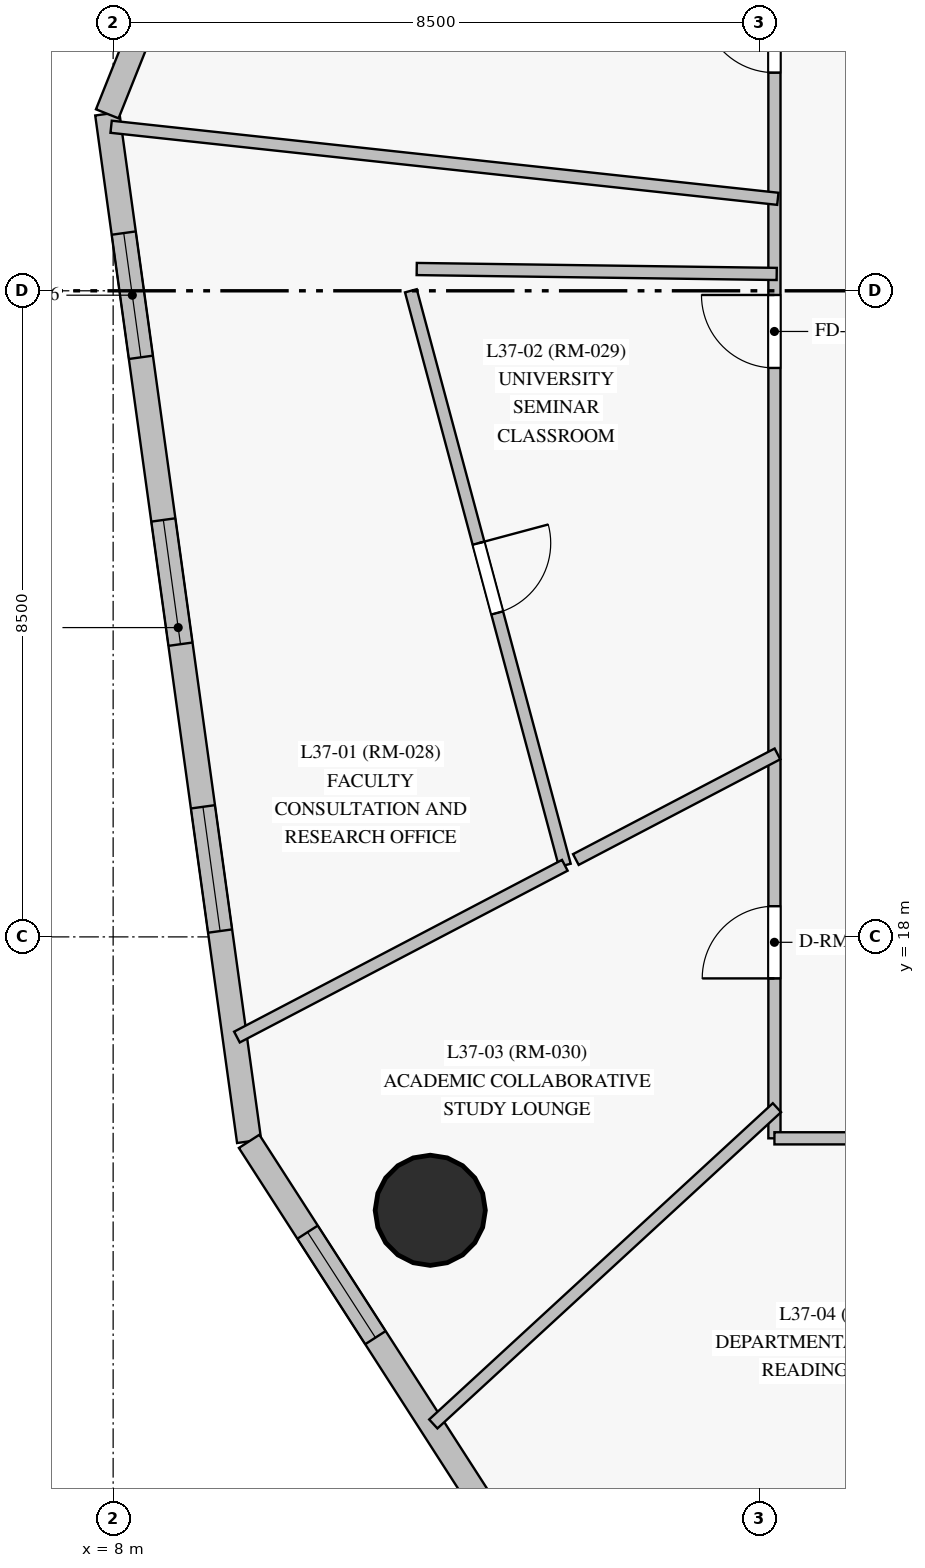
"""IFC4 building model, lengths in metres.
Left out: names, types, materials, properties, quantities, classifications, styles, units other than length and angle.
Written with IfcOpenShell. Run it as: python <this file> out.ifc"""

import sys

from ifc_helpers import new_model, si_unit, direction, frame, frame_2d, origin, origin_with_axes, origin_2d, place, context, subcontext, project, spatial, rectangle, circle, extrude, source, transform, mapped, element, fill, save


model = new_model("IFC4")
c1 = context("Model", 3, precision=1e-05, world=origin(), true_north=direction((0.0, 1.0)))
c2 = subcontext(c1, "Body", "Model", "MODEL_VIEW")
j1 = project(units=[si_unit("LENGTHUNIT", "METRE"), si_unit("PLANEANGLEUNIT", "RADIAN")], contexts=[c1])
p1 = place(None, origin())
s1 = spatial("IfcSite", under=j1, at=p1, CompositionType="ELEMENT")
p2 = place(p1, origin())
s2 = spatial("IfcBuilding", under=s1, at=p2, CompositionType="ELEMENT")
p3 = place(p2, frame((0.0, 0.0, 132.8)))
s3 = spatial("IfcBuildingStorey", under=s2, at=p3, CompositionType="ELEMENT", Elevation=132.8)
m1 = source(origin_with_axes(), c2, "Body", "SweptSolid", [
    extrude(circle(Radius=0.725, at=origin_2d()), origin(), (0.0, 0.0, 1.0), 3.05),
])
p4 = place(p3, frame((12.172, 14.403, 0.0), z_axis=(0.0, 0.0, 1.0), x_axis=(1.0, 0.0, 0.0)))
e1 = element("IfcColumn", 1, at=p4, inside=s3, PredefinedType="COLUMN", context=c2, shape_type="MappedRepresentation", body=[
    mapped(m1, transform((0.0, 0.0, 0.0), scale=1.0)),
])
p5 = place(p3, frame((7.923, 28.828, 0.0), z_axis=(0.0, 0.0, 1.0), x_axis=(0.136771186791, -0.990602666291, 0.0)))
e2 = element("IfcWall", 2, at=p5, inside=s3, PredefinedType="SOLIDWALL", context=c2, shape_type="SweptSolid", body=[
    extrude(rectangle(XDim=13.646, YDim=0.32, at=frame_2d((6.823, 0.0))), origin(), (0.0, 0.0, 1.0), 2.825),
])
p6 = place(p5, frame((1.584, 0.0, 0.85)))
e3 = element("IfcOpeningElement", 3, at=p6, cuts=e2, PredefinedType="OPENING", context=c2, shape_type="SweptSolid", body=[
    extrude(rectangle(XDim=1.65, YDim=1.65, at=frame_2d((0.825, 0.825))), frame((0.0, 0.17, 0.0), z_axis=(0.0, -1.0, 0.0), x_axis=(1.0, 0.0, 0.0)), (0.0, 0.0, 1.0), 0.34),
])
p7 = place(p5, frame((5.394, 0.0, 0.85)))
e4 = element("IfcOpeningElement", 4, at=p7, cuts=e2, PredefinedType="OPENING", context=c2, shape_type="SweptSolid", body=[
    extrude(rectangle(XDim=1.65, YDim=1.65, at=frame_2d((0.825, 0.825))), frame((0.0, 0.17, 0.0), z_axis=(0.0, -1.0, 0.0), x_axis=(1.0, 0.0, 0.0)), (0.0, 0.0, 1.0), 0.34),
])
p8 = place(p5, frame((9.204, 0.0, 0.85)))
e5 = element("IfcOpeningElement", 5, at=p8, cuts=e2, PredefinedType="OPENING", context=c2, shape_type="SweptSolid", body=[
    extrude(rectangle(XDim=1.65, YDim=1.65, at=frame_2d((0.825, 0.825))), frame((0.0, 0.17, 0.0), z_axis=(0.0, -1.0, 0.0), x_axis=(1.0, 0.0, 0.0)), (0.0, 0.0, 1.0), 0.34),
])
p9 = place(p3, frame((9.789, 15.31, 0.0), z_axis=(0.0, 0.0, 1.0), x_axis=(0.541166732634, -0.840915315291, 0.0)))
e6 = element("IfcWall", 6, at=p9, inside=s3, PredefinedType="SOLIDWALL", context=c2, shape_type="SweptSolid", body=[
    extrude(rectangle(XDim=9.438, YDim=0.32, at=frame_2d((4.719, 0.0))), origin(), (0.0, 0.0, 1.0), 2.825),
])
p10 = place(p9, frame((1.421, 0.0, 0.85)))
e7 = element("IfcOpeningElement", 7, at=p10, cuts=e6, PredefinedType="OPENING", context=c2, shape_type="SweptSolid", body=[
    extrude(rectangle(XDim=1.65, YDim=1.65, at=frame_2d((0.825, 0.825))), frame((0.0, 0.17, 0.0), z_axis=(0.0, -1.0, 0.0), x_axis=(1.0, 0.0, 0.0)), (0.0, 0.0, 1.0), 0.34),
])
p11 = place(p9, frame((6.08, 0.0, 0.85)))
e8 = element("IfcOpeningElement", 8, at=p11, cuts=e6, PredefinedType="OPENING", context=c2, shape_type="SweptSolid", body=[
    extrude(rectangle(XDim=1.65, YDim=1.65, at=frame_2d((0.825, 0.825))), frame((0.0, 0.17, 0.0), z_axis=(0.0, -1.0, 0.0), x_axis=(1.0, 0.0, 0.0)), (0.0, 0.0, 1.0), 0.34),
])
p12 = place(p3, frame((11.975, 38.981, 0.0), z_axis=(0.0, 0.0, 1.0), x_axis=(-0.370728292026, -0.928741370615, 0.0)))
e9 = element("IfcWall", 9, at=p12, inside=s3, PredefinedType="SOLIDWALL", context=c2, shape_type="SweptSolid", body=[
    extrude(rectangle(XDim=10.932, YDim=0.32, at=frame_2d((5.466, 0.0))), origin(), (0.0, 0.0, 1.0), 2.825),
])
p13 = place(p12, frame((2.215, 0.0, 0.85)))
e10 = element("IfcOpeningElement", 10, at=p13, cuts=e9, PredefinedType="OPENING", context=c2, shape_type="SweptSolid", body=[
    extrude(rectangle(XDim=1.65, YDim=1.65, at=frame_2d((0.825, 0.825))), frame((0.0, 0.17, 0.0), z_axis=(0.0, -1.0, 0.0), x_axis=(1.0, 0.0, 0.0)), (0.0, 0.0, 1.0), 0.34),
])
p14 = place(p12, frame((7.62, 0.0, 0.85)))
e11 = element("IfcOpeningElement", 11, at=p14, cuts=e9, PredefinedType="OPENING", context=c2, shape_type="SweptSolid", body=[
    extrude(rectangle(XDim=1.65, YDim=1.65, at=frame_2d((0.825, 0.825))), frame((0.0, 0.17, 0.0), z_axis=(0.0, -1.0, 0.0), x_axis=(1.0, 0.0, 0.0)), (0.0, 0.0, 1.0), 0.34),
])
p15 = place(p3, frame((16.7, 15.35, 0.0), z_axis=(0.0, 0.0, 1.0), x_axis=(0.0, 1.0, 0.0)))
e12 = element("IfcWall", 12, at=p15, inside=s3, PredefinedType="PARTITIONING", context=c2, shape_type="SweptSolid", body=[
    extrude(rectangle(XDim=22.3, YDim=0.16, at=frame_2d((11.15, 0.0))), origin(), (0.0, 0.0, 1.0), 2.225),
])
p16 = place(p15, frame((10.135, 0.0, 0.0)))
e13 = element("IfcOpeningElement", 13, at=p16, cuts=e12, PredefinedType="OPENING", context=c2, shape_type="SweptSolid", body=[
    extrude(rectangle(XDim=0.96, YDim=2.15, at=frame_2d((0.48, 1.075))), frame((0.0, 0.09, 0.0), z_axis=(0.0, -1.0, 0.0), x_axis=(1.0, 0.0, 0.0)), (0.0, 0.0, 1.0), 0.18),
])
p17 = place(p15, frame((2.104, 0.0, 0.0)))
e14 = element("IfcOpeningElement", 14, at=p17, cuts=e12, PredefinedType="OPENING", context=c2, shape_type="SweptSolid", body=[
    extrude(rectangle(XDim=0.95, YDim=2.15, at=frame_2d((0.475, 1.075))), frame((0.0, 0.09, 0.0), z_axis=(0.0, -1.0, 0.0), x_axis=(1.0, 0.0, 0.0)), (0.0, 0.0, 1.0), 0.18),
])
p18 = place(p15, frame((14.02, 0.0, 0.0)))
e15 = element("IfcOpeningElement", 15, at=p18, cuts=e12, PredefinedType="OPENING", context=c2, shape_type="SweptSolid", body=[
    extrude(rectangle(XDim=0.95, YDim=2.15, at=frame_2d((0.475, 1.075))), frame((0.0, 0.09, 0.0), z_axis=(0.0, -1.0, 0.0), x_axis=(1.0, 0.0, 0.0)), (0.0, 0.0, 1.0), 0.18),
])
p19 = place(p3, frame((27.55, 15.35, 0.0), z_axis=(0.0, 0.0, 1.0), x_axis=(-1.0, 0.0, 0.0)))
e16 = element("IfcWall", 16, at=p19, inside=s3, PredefinedType="PARTITIONING", context=c2, shape_type="SweptSolid", body=[
    extrude(rectangle(XDim=10.85, YDim=0.16, at=frame_2d((5.425, 0.0))), origin(), (0.0, 0.0, 1.0), 2.325),
])
p20 = place(p19, frame((6.577, 0.0, 0.0)))
e17 = element("IfcOpeningElement", 17, at=p20, cuts=e16, PredefinedType="OPENING", context=c2, shape_type="SweptSolid", body=[
    extrude(rectangle(XDim=0.95, YDim=2.15, at=frame_2d((0.475, 1.075))), frame((0.0, 0.09, 0.0), z_axis=(0.0, -1.0, 0.0), x_axis=(1.0, 0.0, 0.0)), (0.0, 0.0, 1.0), 0.18),
])
p21 = place(p19, frame((3.512, 0.0, 0.0)))
e18 = element("IfcOpeningElement", 18, at=p21, cuts=e16, PredefinedType="OPENING", context=c2, shape_type="SweptSolid", body=[
    extrude(rectangle(XDim=0.95, YDim=2.15, at=frame_2d((0.475, 1.075))), frame((0.0, 0.09, 0.0), z_axis=(0.0, -1.0, 0.0), x_axis=(1.0, 0.0, 0.0)), (0.0, 0.0, 1.0), 0.18),
])
p22 = place(p19, frame((1.948, 0.0, 0.0)))
e19 = element("IfcOpeningElement", 19, at=p22, cuts=e16, PredefinedType="OPENING", context=c2, shape_type="SweptSolid", body=[
    extrude(rectangle(XDim=0.95, YDim=2.15, at=frame_2d((0.475, 1.075))), frame((0.0, 0.09, 0.0), z_axis=(0.0, -1.0, 0.0), x_axis=(1.0, 0.0, 0.0)), (0.0, 0.0, 1.0), 0.18),
])
p23 = place(p3, frame((22.265, 15.376, 0.0), z_axis=(0.0, 0.0, 1.0), x_axis=(-0.484869000513, -0.874586789485, 0.0)))
e20 = element("IfcWall", 20, at=p23, inside=s3, PredefinedType="PARTITIONING", context=c2, shape_type="SweptSolid", body=[
    extrude(rectangle(XDim=10.502, YDim=0.16, at=frame_2d((5.251, 0.0))), origin(), (0.0, 0.0, 1.0), 2.825),
])
p24 = place(p3, frame((7.973, 28.658, 0.0), z_axis=(0.0, 0.0, 1.0), x_axis=(0.994210323824, -0.107451533272, 0.0)))
e21 = element("IfcWall", 21, at=p24, inside=s3, PredefinedType="PARTITIONING", context=c2, shape_type="SweptSolid", body=[
    extrude(rectangle(XDim=8.823, YDim=0.16, at=frame_2d((4.411, 0.0))), origin(), (0.0, 0.0, 1.0), 2.825),
])
p25 = place(p3, frame((11.917, 26.5, 0.0), z_axis=(0.0, 0.0, 1.0), x_axis=(0.258814064206, -0.965927160903, 0.0)))
e22 = element("IfcWall", 22, at=p25, inside=s3, PredefinedType="PARTITIONING", context=c2, shape_type="SweptSolid", body=[
    extrude(rectangle(XDim=7.825, YDim=0.16, at=frame_2d((3.912, 0.0))), origin(), (0.0, 0.0, 1.0), 2.225),
])
p26 = place(p25, frame((3.438, 0.0, 0.0)))
e23 = element("IfcOpeningElement", 23, at=p26, cuts=e22, PredefinedType="OPENING", context=c2, shape_type="SweptSolid", body=[
    extrude(rectangle(XDim=0.95, YDim=2.15, at=frame_2d((0.475, 1.075))), frame((0.0, 0.09, 0.0), z_axis=(0.0, -1.0, 0.0), x_axis=(1.0, 0.0, 0.0)), (0.0, 0.0, 1.0), 0.18),
])
p27 = place(p3, frame((16.733, 15.753, 0.0), z_axis=(0.0, 0.0, 1.0), x_axis=(-0.73584309599, -0.677152078992, 0.0)))
e24 = element("IfcWall", 24, at=p27, inside=s3, PredefinedType="PARTITIONING", context=c2, shape_type="SweptSolid", body=[
    extrude(rectangle(XDim=6.144, YDim=0.16, at=frame_2d((3.072, 0.0))), origin(), (0.0, 0.0, 1.0), 2.825),
])
p28 = place(p3, frame((13.942, 18.942, 0.0), z_axis=(0.0, 0.0, 1.0), x_axis=(-0.885814853162, -0.464038840957, 0.0)))
e25 = element("IfcWall", 25, at=p28, inside=s3, PredefinedType="PARTITIONING", context=c2, shape_type="SweptSolid", body=[
    extrude(rectangle(XDim=4.87, YDim=0.16, at=frame_2d((2.435, 0.0))), origin(), (0.0, 0.0, 1.0), 2.825),
])
p29 = place(p3, frame((16.73, 26.722, 0.0), z_axis=(0.0, 0.0, 1.0), x_axis=(-0.999906003138, 0.013710758123, 0.0)))
e26 = element("IfcWall", 26, at=p29, inside=s3, PredefinedType="PARTITIONING", context=c2, shape_type="SweptSolid", body=[
    extrude(rectangle(XDim=4.737, YDim=0.16, at=frame_2d((2.368, 0.0))), origin(), (0.0, 0.0, 1.0), 2.825),
])
p30 = place(p3, frame((16.74, 20.407, 0.0), z_axis=(0.0, 0.0, 1.0), x_axis=(-0.885820363554, -0.464028321887, 0.0)))
e27 = element("IfcWall", 27, at=p30, inside=s3, PredefinedType="PARTITIONING", context=c2, shape_type="SweptSolid", body=[
    extrude(rectangle(XDim=2.994, YDim=0.16, at=frame_2d((1.497, 0.0))), origin(), (0.0, 0.0, 1.0), 2.825),
])
m2 = source(origin_with_axes(), c2, "Body", "SweptSolid", [
    extrude(rectangle(XDim=1.65, YDim=1.65, at=frame_2d((0.825, 0.825))), frame((0.0, 0.03, 0.0), z_axis=(0.0, -1.0, 0.0), x_axis=(1.0, 0.0, 0.0)), (0.0, 0.0, 1.0), 0.06),
])
p31 = place(p6, origin())
e28 = element("IfcWindow", 28, at=p31, inside=s3, PartitioningType="SINGLE_PANEL", PredefinedType="WINDOW", context=c2, shape_type="MappedRepresentation", body=[
    mapped(m2, transform((0.0, 0.0, 0.0), scale=1.0)),
])
fill(e3, e28)
p32 = place(p7, origin())
e29 = element("IfcWindow", 29, at=p32, inside=s3, PartitioningType="SINGLE_PANEL", PredefinedType="WINDOW", context=c2, shape_type="MappedRepresentation", body=[
    mapped(m2, transform((0.0, 0.0, 0.0), scale=1.0)),
])
fill(e4, e29)
p33 = place(p8, origin())
e30 = element("IfcWindow", 30, at=p33, inside=s3, PartitioningType="SINGLE_PANEL", PredefinedType="WINDOW", context=c2, shape_type="MappedRepresentation", body=[
    mapped(m2, transform((0.0, 0.0, 0.0), scale=1.0)),
])
fill(e5, e30)
p34 = place(p10, origin())
e31 = element("IfcWindow", 31, at=p34, inside=s3, PartitioningType="SINGLE_PANEL", PredefinedType="WINDOW", context=c2, shape_type="MappedRepresentation", body=[
    mapped(m2, transform((0.0, 0.0, 0.0), scale=1.0)),
])
fill(e7, e31)
m3 = source(origin_with_axes(), c2, "Body", "SweptSolid", [
    extrude(rectangle(XDim=0.96, YDim=2.15, at=frame_2d((0.48, 1.075))), frame((0.0, 0.025, 0.0), z_axis=(0.0, -1.0, 0.0), x_axis=(1.0, 0.0, 0.0)), (0.0, 0.0, 1.0), 0.05),
])
p35 = place(p16, origin())
e32 = element("IfcDoor", 32, at=p35, inside=s3, OperationType="SINGLE_SWING_RIGHT", PredefinedType="DOOR", context=c2, shape_type="MappedRepresentation", body=[
    mapped(m3, transform((0.0, 0.0, 0.0), scale=1.0)),
])
fill(e13, e32)
m4 = source(origin_with_axes(), c2, "Body", "SweptSolid", [
    extrude(rectangle(XDim=0.95, YDim=2.15, at=frame_2d((0.475, 1.075))), frame((0.0, 0.025, 0.0), z_axis=(0.0, -1.0, 0.0), x_axis=(1.0, 0.0, 0.0)), (0.0, 0.0, 1.0), 0.05),
])
p36 = place(p17, origin())
e33 = element("IfcDoor", 33, at=p36, inside=s3, OperationType="SINGLE_SWING_LEFT", PredefinedType="DOOR", context=c2, shape_type="MappedRepresentation", body=[
    mapped(m4, transform((0.0, 0.0, 0.0), scale=1.0)),
])
fill(e14, e33)
p37 = place(p18, origin())
e34 = element("IfcDoor", 34, at=p37, inside=s3, OperationType="SINGLE_SWING_RIGHT", PredefinedType="DOOR", context=c2, shape_type="MappedRepresentation", body=[
    mapped(m4, transform((0.0, 0.0, 0.0), scale=1.0)),
])
fill(e15, e34)
p38 = place(p26, origin())
e35 = element("IfcDoor", 35, at=p38, inside=s3, OperationType="SINGLE_SWING_LEFT", PredefinedType="DOOR", context=c2, shape_type="MappedRepresentation", body=[
    mapped(m4, transform((0.0, 0.0, 0.0), scale=1.0)),
])
fill(e23, e35)
save(model, sys.argv[1])
